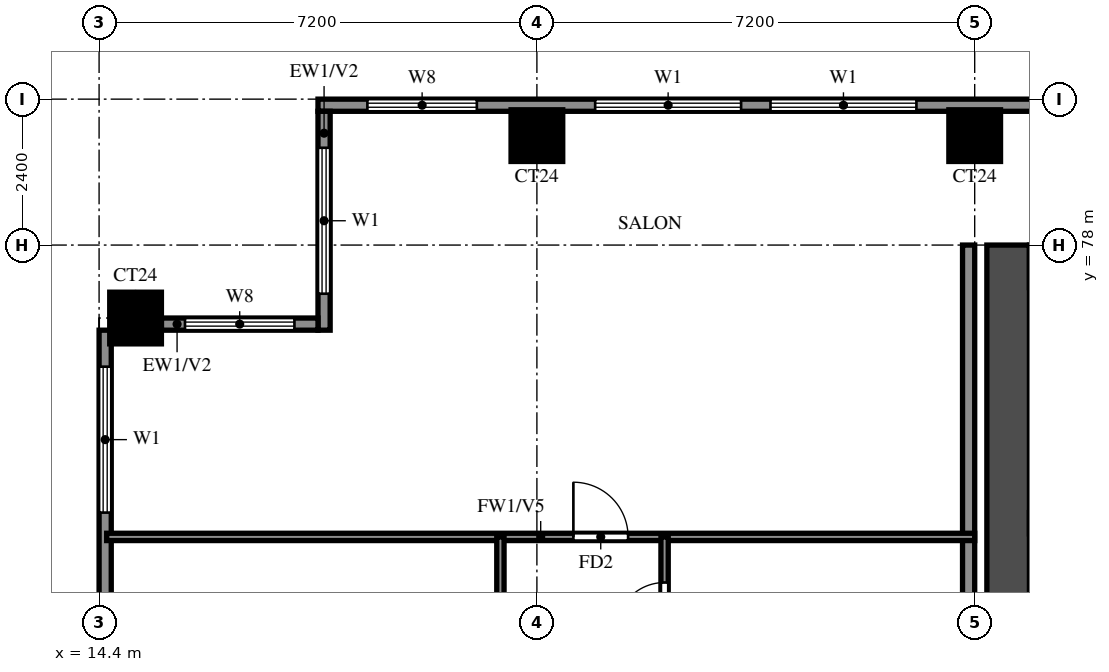
"""IFC4 building model, lengths in metres.
Left out: names, types, materials, properties, quantities, classifications, styles, units other than length and angle.
Written with IfcOpenShell. Run it as: python <this file> out.ifc"""

import sys

from ifc_helpers import new_model, si_unit, direction, frame, frame_2d, origin, origin_2d, place, context, subcontext, project, spatial, rectangle, extrude, source, transform, mapped, element, fill, save


model = new_model("IFC4")
c1 = context("Model", 3, precision=1e-05, world=origin(), true_north=direction((0.0, 1.0)))
c2 = subcontext(c1, "Body", "Model", "MODEL_VIEW")
j1 = project(units=[si_unit("LENGTHUNIT", "METRE"), si_unit("PLANEANGLEUNIT", "RADIAN")], contexts=[c1])
p1 = place(None, origin())
s1 = spatial("IfcSite", under=j1, at=p1, CompositionType="ELEMENT")
p2 = place(p1, origin())
s2 = spatial("IfcBuilding", under=s1, at=p2, CompositionType="ELEMENT")
p3 = place(p2, frame((0.0, 0.0, 160.5)))
s3 = spatial("IfcBuildingStorey", under=s2, at=p3, CompositionType="ELEMENT", Elevation=160.5)
m1 = source(origin(), c2, "Body", "SweptSolid", [
    extrude(rectangle(XDim=0.85, YDim=0.85, at=origin_2d()), origin(), (0.0, 0.0, 1.0), 3.2),
])
for number, where, z_axis, x_axis in (
    (1, (15.0, 76.8, 0.0), (0.0, 0.0, 1.0), (1.0, 0.0, 0.0)),
    (2, (21.6, 79.8, 0.0), (0.0, 0.0, 1.0), (1.0, 0.0, 0.0)),
    (3, (28.8, 79.8, 0.0), (0.0, 0.0, 1.0), (1.0, 0.0, 0.0)),
):
    element("IfcColumn", number, at=place(p3, frame(where, z_axis=z_axis, x_axis=x_axis)), inside=s3, PredefinedType="COLUMN", context=c2, shape_type="MappedRepresentation", body=[
        mapped(m1, transform((0.0, 0.0, 0.0))),
    ])
p4 = place(p3, frame((29.35, 66.1, 0.0), z_axis=(0.0, 0.0, 1.0), x_axis=(0.0, 1.0, 0.0)))
e4 = element("IfcWall", 4, at=p4, inside=s3, PredefinedType="SHEAR", context=c2, shape_type="SweptSolid", body=[
    extrude(rectangle(XDim=11.9, YDim=0.7, at=frame_2d((5.95, 0.0))), origin(), (0.0, 0.0, 1.0), 3.2),
])
p5 = place(p3, frame((72.0, 80.3, 0.0), z_axis=(0.0, 0.0, 1.0), x_axis=(-1.0, 0.0, 0.0)))
e5 = element("IfcWall", 5, at=p5, inside=s3, PredefinedType="SOLIDWALL", context=c2, shape_type="SweptSolid", body=[
    extrude(rectangle(XDim=54.0, YDim=0.2, at=frame_2d((27.0, 0.0))), origin(), (0.0, 0.0, 1.0), 3.2),
])
p6 = place(p5, frame((44.158, 0.0, 0.6)))
e6 = element("IfcOpeningElement", 6, at=p6, cuts=e5, PredefinedType="OPENING", context=c2, shape_type="SweptSolid", body=[
    extrude(rectangle(XDim=2.4, YDim=2.4, at=frame_2d((1.2, 1.2))), frame((0.0, 0.11, 0.0), z_axis=(0.0, -1.0, 0.0), x_axis=(1.0, 0.0, 0.0)), (0.0, 0.0, 1.0), 0.22),
])
p7 = place(p5, frame((47.042, 0.0, 0.6)))
e7 = element("IfcOpeningElement", 7, at=p7, cuts=e5, PredefinedType="OPENING", context=c2, shape_type="SweptSolid", body=[
    extrude(rectangle(XDim=2.4, YDim=2.4, at=frame_2d((1.2, 1.2))), frame((0.0, 0.11, 0.0), z_axis=(0.0, -1.0, 0.0), x_axis=(1.0, 0.0, 0.0)), (0.0, 0.0, 1.0), 0.22),
])
p8 = place(p5, frame((51.387, 0.0, 0.6)))
e8 = element("IfcOpeningElement", 8, at=p8, cuts=e5, PredefinedType="OPENING", context=c2, shape_type="SweptSolid", body=[
    extrude(rectangle(XDim=1.8, YDim=2.4, at=frame_2d((0.9, 1.2))), frame((0.0, 0.11, 0.0), z_axis=(0.0, -1.0, 0.0), x_axis=(1.0, 0.0, 0.0)), (0.0, 0.0, 1.0), 0.22),
])
p9 = place(p3, frame((18.1, 80.2, 0.0), z_axis=(0.0, 0.0, 1.0), x_axis=(0.0, -1.0, 0.0)))
e9 = element("IfcWall", 9, at=p9, inside=s3, PredefinedType="SOLIDWALL", context=c2, shape_type="SweptSolid", body=[
    extrude(rectangle(XDim=3.6, YDim=0.2, at=frame_2d((1.8, 0.0))), origin(), (0.0, 0.0, 1.0), 3.2),
])
p10 = place(p9, frame((0.6, 0.0, 0.6)))
e10 = element("IfcOpeningElement", 10, at=p10, cuts=e9, PredefinedType="OPENING", context=c2, shape_type="SweptSolid", body=[
    extrude(rectangle(XDim=2.4, YDim=2.4, at=frame_2d((1.2, 1.2))), frame((0.0, 0.11, 0.0), z_axis=(0.0, -1.0, 0.0), x_axis=(1.0, 0.0, 0.0)), (0.0, 0.0, 1.0), 0.22),
])
p11 = place(p3, frame((18.0, 76.7, 0.0), z_axis=(0.0, 0.0, 1.0), x_axis=(-1.0, 0.0, 0.0)))
e11 = element("IfcWall", 11, at=p11, inside=s3, PredefinedType="SOLIDWALL", context=c2, shape_type="SweptSolid", body=[
    extrude(rectangle(XDim=2.575, YDim=0.2, at=frame_2d((1.288, 0.0))), origin(), (0.0, 0.0, 1.0), 3.2),
])
p12 = place(p11, frame((0.387, 0.0, 0.6)))
e12 = element("IfcOpeningElement", 12, at=p12, cuts=e11, PredefinedType="OPENING", context=c2, shape_type="SweptSolid", body=[
    extrude(rectangle(XDim=1.8, YDim=2.4, at=frame_2d((0.9, 1.2))), frame((0.0, 0.11, 0.0), z_axis=(0.0, -1.0, 0.0), x_axis=(1.0, 0.0, 0.0)), (0.0, 0.0, 1.0), 0.22),
])
p13 = place(p3, frame((14.5, 76.6, 0.0), z_axis=(0.0, 0.0, 1.0), x_axis=(0.0, -1.0, 0.0)))
e13 = element("IfcWall", 13, at=p13, inside=s3, PredefinedType="SOLIDWALL", context=c2, shape_type="SweptSolid", body=[
    extrude(rectangle(XDim=33.4, YDim=0.2, at=frame_2d((16.7, 0.0))), origin(), (0.0, 0.0, 1.0), 3.2),
])
p14 = place(p13, frame((15.1, 0.0, 0.0)))
e14 = element("IfcOpeningElement", 14, at=p14, cuts=e13, PredefinedType="OPENING", context=c2, shape_type="SweptSolid", body=[
    extrude(rectangle(XDim=1.8, YDim=2.4, at=frame_2d((0.9, 1.2))), frame((0.0, 0.11, 0.0), z_axis=(0.0, -1.0, 0.0), x_axis=(1.0, 0.0, 0.0)), (0.0, 0.0, 1.0), 0.22),
])
p15 = place(p13, frame((29.887, 0.0, 0.6)))
e15 = element("IfcOpeningElement", 15, at=p15, cuts=e13, PredefinedType="OPENING", context=c2, shape_type="SweptSolid", body=[
    extrude(rectangle(XDim=2.4, YDim=2.4, at=frame_2d((1.2, 1.2))), frame((0.0, 0.11, 0.0), z_axis=(0.0, -1.0, 0.0), x_axis=(1.0, 0.0, 0.0)), (0.0, 0.0, 1.0), 0.22),
])
p16 = place(p13, frame((22.358, 0.0, 0.6)))
e16 = element("IfcOpeningElement", 16, at=p16, cuts=e13, PredefinedType="OPENING", context=c2, shape_type="SweptSolid", body=[
    extrude(rectangle(XDim=2.4, YDim=2.4, at=frame_2d((1.2, 1.2))), frame((0.0, 0.11, 0.0), z_axis=(0.0, -1.0, 0.0), x_axis=(1.0, 0.0, 0.0)), (0.0, 0.0, 1.0), 0.22),
])
p17 = place(p13, frame((25.242, 0.0, 0.6)))
e17 = element("IfcOpeningElement", 17, at=p17, cuts=e13, PredefinedType="OPENING", context=c2, shape_type="SweptSolid", body=[
    extrude(rectangle(XDim=2.4, YDim=2.4, at=frame_2d((1.2, 1.2))), frame((0.0, 0.11, 0.0), z_axis=(0.0, -1.0, 0.0), x_axis=(1.0, 0.0, 0.0)), (0.0, 0.0, 1.0), 0.22),
])
p18 = place(p13, frame((19.113, 0.0, 0.6)))
e18 = element("IfcOpeningElement", 18, at=p18, cuts=e13, PredefinedType="OPENING", context=c2, shape_type="SweptSolid", body=[
    extrude(rectangle(XDim=1.8, YDim=2.4, at=frame_2d((0.9, 1.2))), frame((0.0, 0.11, 0.0), z_axis=(0.0, -1.0, 0.0), x_axis=(1.0, 0.0, 0.0)), (0.0, 0.0, 1.0), 0.22),
])
p19 = place(p13, frame((8.387, 0.0, 0.6)))
e19 = element("IfcOpeningElement", 19, at=p19, cuts=e13, PredefinedType="OPENING", context=c2, shape_type="SweptSolid", body=[
    extrude(rectangle(XDim=2.4, YDim=2.4, at=frame_2d((1.2, 1.2))), frame((0.0, 0.11, 0.0), z_axis=(0.0, -1.0, 0.0), x_axis=(1.0, 0.0, 0.0)), (0.0, 0.0, 1.0), 0.22),
])
p20 = place(p13, frame((12.512, 0.0, 0.6)))
e20 = element("IfcOpeningElement", 20, at=p20, cuts=e13, PredefinedType="OPENING", context=c2, shape_type="SweptSolid", body=[
    extrude(rectangle(XDim=1.2, YDim=2.4, at=frame_2d((0.6, 1.2))), frame((0.0, 0.11, 0.0), z_axis=(0.0, -1.0, 0.0), x_axis=(1.0, 0.0, 0.0)), (0.0, 0.0, 1.0), 0.22),
])
p21 = place(p13, frame((4.562, 0.0, 1.5)))
e21 = element("IfcOpeningElement", 21, at=p21, cuts=e13, PredefinedType="OPENING", context=c2, shape_type="SweptSolid", body=[
    extrude(rectangle(XDim=0.9, YDim=0.9, at=frame_2d((0.45, 0.45))), frame((0.0, 0.11, 0.0), z_axis=(0.0, -1.0, 0.0), x_axis=(1.0, 0.0, 0.0)), (0.0, 0.0, 1.0), 0.22),
])
p22 = place(p13, frame((0.6, 0.0, 0.6)))
e22 = element("IfcOpeningElement", 22, at=p22, cuts=e13, PredefinedType="OPENING", context=c2, shape_type="SweptSolid", body=[
    extrude(rectangle(XDim=2.4, YDim=2.4, at=frame_2d((1.2, 1.2))), frame((0.0, 0.11, 0.0), z_axis=(0.0, -1.0, 0.0), x_axis=(1.0, 0.0, 0.0)), (0.0, 0.0, 1.0), 0.22),
])
p23 = place(p3, frame((28.7, 62.4, 0.0), z_axis=(0.0, 0.0, 1.0), x_axis=(0.0, 1.0, 0.0)))
e23 = element("IfcWall", 23, at=p23, inside=s3, PredefinedType="SOLIDWALL", context=c2, shape_type="SweptSolid", body=[
    extrude(rectangle(XDim=15.6, YDim=0.2, at=frame_2d((7.8, 0.0))), origin(), (0.0, 0.0, 1.0), 3.2),
])
p24 = place(p3, frame((14.525, 73.2, 0.0), z_axis=(0.0, 0.0, 1.0), x_axis=(1.0, 0.0, 0.0)))
e24 = element("IfcWall", 24, at=p24, inside=s3, PredefinedType="PARTITIONING", context=c2, shape_type="SweptSolid", body=[
    extrude(rectangle(XDim=14.275, YDim=0.12, at=frame_2d((7.138, 0.0))), origin(), (0.0, 0.0, 1.0), 2.3),
])
p25 = place(p24, frame((7.675, 0.0, 0.0)))
e25 = element("IfcOpeningElement", 25, at=p25, cuts=e24, PredefinedType="OPENING", context=c2, shape_type="SweptSolid", body=[
    extrude(rectangle(XDim=0.9, YDim=2.1, at=frame_2d((0.45, 1.05))), frame((0.0, 0.07, 0.0), z_axis=(0.0, -1.0, 0.0), x_axis=(1.0, 0.0, 0.0)), (0.0, 0.0, 1.0), 0.14),
])
p26 = place(p3, frame((21.0, 69.6, 0.0), z_axis=(0.0, 0.0, 1.0), x_axis=(0.0, 1.0, 0.0)))
e26 = element("IfcWall", 26, at=p26, inside=s3, PredefinedType="PARTITIONING", context=c2, shape_type="SweptSolid", body=[
    extrude(rectangle(XDim=3.6, YDim=0.12, at=frame_2d((1.8, 0.0))), origin(), (0.0, 0.0, 1.0), 3.2),
])
p27 = place(p3, frame((23.7, 61.2, 0.0), z_axis=(0.0, 0.0, 1.0), x_axis=(0.0, 1.0, 0.0)))
e27 = element("IfcWall", 27, at=p27, inside=s3, PredefinedType="PARTITIONING", context=c2, shape_type="SweptSolid", body=[
    extrude(rectangle(XDim=12.0, YDim=0.12, at=frame_2d((6.0, 0.0))), origin(), (0.0, 0.0, 1.0), 3.2),
])
p28 = place(p27, frame((4.2, 0.0, 0.0)))
e28 = element("IfcOpeningElement", 28, at=p28, cuts=e27, PredefinedType="OPENING", context=c2, shape_type="SweptSolid", body=[
    extrude(rectangle(XDim=0.9, YDim=2.1, at=frame_2d((0.45, 1.05))), frame((0.0, 0.07, 0.0), z_axis=(0.0, -1.0, 0.0), x_axis=(1.0, 0.0, 0.0)), (0.0, 0.0, 1.0), 0.14),
])
p29 = place(p27, frame((7.975, 0.0, 0.0)))
e29 = element("IfcOpeningElement", 29, at=p29, cuts=e27, PredefinedType="OPENING", context=c2, shape_type="SweptSolid", body=[
    extrude(rectangle(XDim=0.8, YDim=2.1, at=frame_2d((0.4, 1.05))), frame((0.0, 0.07, 0.0), z_axis=(0.0, -1.0, 0.0), x_axis=(1.0, 0.0, 0.0)), (0.0, 0.0, 1.0), 0.14),
])
p30 = place(p27, frame((10.45, 0.0, 0.0)))
e30 = element("IfcOpeningElement", 30, at=p30, cuts=e27, PredefinedType="OPENING", context=c2, shape_type="SweptSolid", body=[
    extrude(rectangle(XDim=0.8, YDim=2.1, at=frame_2d((0.4, 1.05))), frame((0.0, 0.07, 0.0), z_axis=(0.0, -1.0, 0.0), x_axis=(1.0, 0.0, 0.0)), (0.0, 0.0, 1.0), 0.14),
])
p31 = place(p6, origin())
e31 = element("IfcWindow", 31, at=p31, inside=s3, PartitioningType="DOUBLE_PANEL_VERTICAL", PredefinedType="WINDOW", context=c2, shape_type="SweptSolid", body=[
    extrude(rectangle(XDim=2.4, YDim=2.4, at=frame_2d((1.2, 1.2))), frame((0.0, 0.03, 0.0), z_axis=(0.0, -1.0, 0.0), x_axis=(1.0, 0.0, 0.0)), (0.0, 0.0, 1.0), 0.06),
])
fill(e6, e31)
p32 = place(p7, origin())
e32 = element("IfcWindow", 32, at=p32, inside=s3, PartitioningType="DOUBLE_PANEL_VERTICAL", PredefinedType="WINDOW", context=c2, shape_type="SweptSolid", body=[
    extrude(rectangle(XDim=2.4, YDim=2.4, at=frame_2d((1.2, 1.2))), frame((0.0, 0.03, 0.0), z_axis=(0.0, -1.0, 0.0), x_axis=(1.0, 0.0, 0.0)), (0.0, 0.0, 1.0), 0.06),
])
fill(e7, e32)
p33 = place(p8, origin())
e33 = element("IfcWindow", 33, at=p33, inside=s3, PartitioningType="DOUBLE_PANEL_VERTICAL", PredefinedType="WINDOW", context=c2, shape_type="SweptSolid", body=[
    extrude(rectangle(XDim=1.8, YDim=2.4, at=frame_2d((0.9, 1.2))), frame((0.0, 0.03, 0.0), z_axis=(0.0, -1.0, 0.0), x_axis=(1.0, 0.0, 0.0)), (0.0, 0.0, 1.0), 0.06),
])
fill(e8, e33)
p34 = place(p10, origin())
e34 = element("IfcWindow", 34, at=p34, inside=s3, PartitioningType="DOUBLE_PANEL_VERTICAL", PredefinedType="WINDOW", context=c2, shape_type="SweptSolid", body=[
    extrude(rectangle(XDim=2.4, YDim=2.4, at=frame_2d((1.2, 1.2))), frame((0.0, 0.03, 0.0), z_axis=(0.0, -1.0, 0.0), x_axis=(1.0, 0.0, 0.0)), (0.0, 0.0, 1.0), 0.06),
])
fill(e10, e34)
p35 = place(p12, origin())
e35 = element("IfcWindow", 35, at=p35, inside=s3, PartitioningType="DOUBLE_PANEL_VERTICAL", PredefinedType="WINDOW", context=c2, shape_type="SweptSolid", body=[
    extrude(rectangle(XDim=1.8, YDim=2.4, at=frame_2d((0.9, 1.2))), frame((0.0, 0.03, 0.0), z_axis=(0.0, -1.0, 0.0), x_axis=(1.0, 0.0, 0.0)), (0.0, 0.0, 1.0), 0.06),
])
fill(e12, e35)
p36 = place(p22, origin())
e36 = element("IfcWindow", 36, at=p36, inside=s3, PartitioningType="DOUBLE_PANEL_VERTICAL", PredefinedType="WINDOW", context=c2, shape_type="SweptSolid", body=[
    extrude(rectangle(XDim=2.4, YDim=2.4, at=frame_2d((1.2, 1.2))), frame((0.0, 0.03, 0.0), z_axis=(0.0, -1.0, 0.0), x_axis=(1.0, 0.0, 0.0)), (0.0, 0.0, 1.0), 0.06),
])
fill(e22, e36)
p37 = place(p25, origin())
e37 = element("IfcDoor", 37, at=p37, inside=s3, OperationType="SINGLE_SWING_LEFT", PredefinedType="DOOR", context=c2, shape_type="SweptSolid", body=[
    extrude(rectangle(XDim=0.9, YDim=2.1, at=frame_2d((0.45, 1.05))), frame((0.0, 0.025, 0.0), z_axis=(0.0, -1.0, 0.0), x_axis=(1.0, 0.0, 0.0)), (0.0, 0.0, 1.0), 0.05),
])
fill(e25, e37)
p38 = place(p30, origin())
e38 = element("IfcDoor", 38, at=p38, inside=s3, OperationType="SINGLE_SWING_LEFT", PredefinedType="DOOR", context=c2, shape_type="SweptSolid", body=[
    extrude(rectangle(XDim=0.8, YDim=2.1, at=frame_2d((0.4, 1.05))), frame((0.0, 0.025, 0.0), z_axis=(0.0, -1.0, 0.0), x_axis=(1.0, 0.0, 0.0)), (0.0, 0.0, 1.0), 0.05),
])
fill(e30, e38)
save(model, sys.argv[1])
